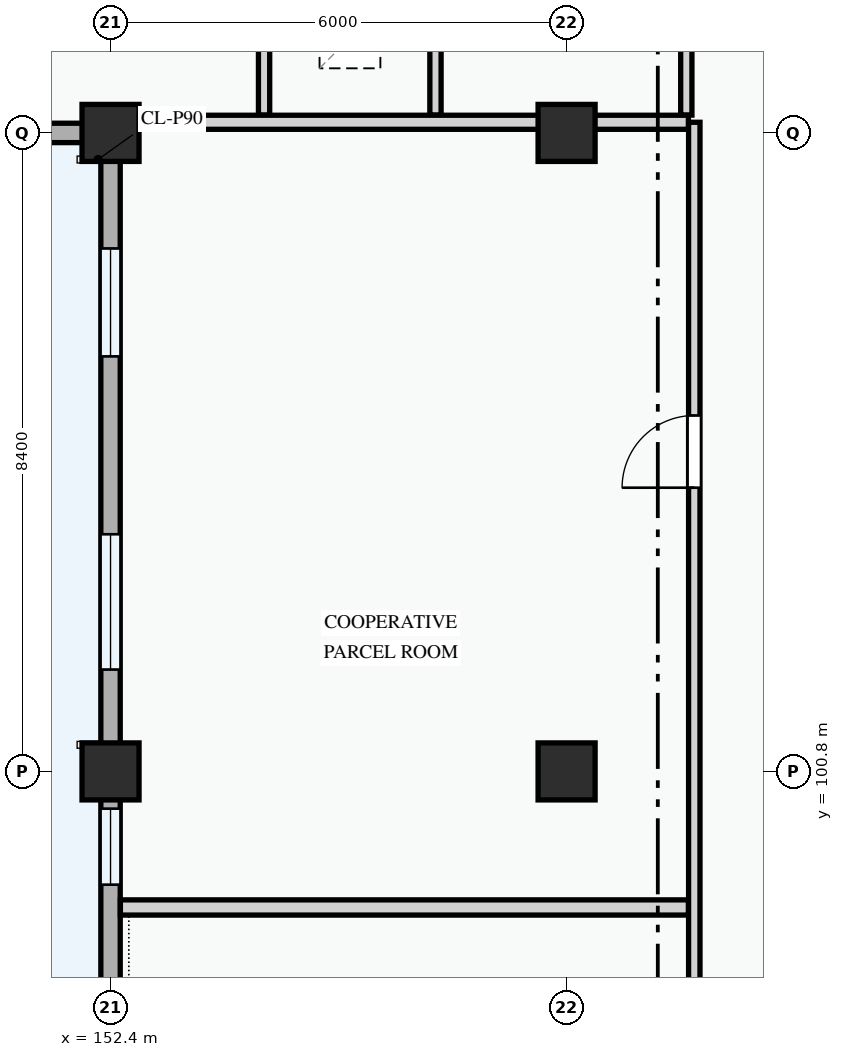
"""IFC4 building model, lengths in metres.
Left out: names, types, materials, properties, quantities, classifications, styles, units other than length and angle.
Written with IfcOpenShell. Run it as: python <this file> out.ifc"""

import sys

from ifc_helpers import new_model, si_unit, direction, frame, frame_2d, origin, origin_2d, place, context, subcontext, project, spatial, rectangle, extrude, element, fill, save


model = new_model("IFC4")
c1 = context("Model", 3, precision=1e-05, world=origin(), true_north=direction((0.0, 1.0)))
c2 = subcontext(c1, "Body", "Model", "MODEL_VIEW")
j1 = project(units=[si_unit("LENGTHUNIT", "METRE"), si_unit("PLANEANGLEUNIT", "RADIAN")], contexts=[c1])
p1 = place(None, origin())
s1 = spatial("IfcSite", under=j1, at=p1, CompositionType="ELEMENT")
p2 = place(p1, origin())
s2 = spatial("IfcBuilding", under=s1, at=p2, CompositionType="ELEMENT")
p3 = place(p2, origin())
s3 = spatial("IfcBuildingStorey", under=s2, at=p3, CompositionType="ELEMENT", Elevation=0.0)
for number, where, z_axis, x_axis in (
    (1, (152.4, 100.8, 0.0), (0.0, 0.0, 1.0), (1.0, 0.0, 0.0)),
    (2, (152.4, 109.2, 0.0), (0.0, 0.0, 1.0), (1.0, 0.0, 0.0)),
    (3, (158.4, 100.8, 0.0), (0.0, 0.0, 1.0), (1.0, 0.0, 0.0)),
    (4, (158.4, 109.2, 0.0), (0.0, 0.0, 1.0), (1.0, 0.0, 0.0)),
):
    element("IfcColumn", number, at=place(p3, frame(where, z_axis=z_axis, x_axis=x_axis)), inside=s3, PredefinedType="COLUMN", context=c2, shape_type="SweptSolid", body=[
        extrude(rectangle(XDim=0.75, YDim=0.75, at=origin_2d()), origin(), (0.0, 0.0, 1.0), 4.5),
    ])
p4 = place(p3, frame((144.0, 109.2, 0.0), z_axis=(0.0, 0.0, 1.0), x_axis=(1.0, 0.0, 0.0)))
e5 = element("IfcWall", 5, at=p4, inside=s3, PredefinedType="STANDARD", context=c2, shape_type="SweptSolid", body=[
    extrude(rectangle(XDim=8.4, YDim=0.255, at=frame_2d((4.2, 0.0))), origin(), (0.0, 0.0, 1.0), 3.485),
])
p5 = place(p4, frame((0.79, 0.0, 0.78)))
e6 = element("IfcOpeningElement", 6, at=p5, cuts=e5, PredefinedType="OPENING", context=c2, shape_type="SweptSolid", body=[
    extrude(rectangle(XDim=1.8, YDim=1.5, at=frame_2d((0.9, 0.75))), frame((0.0, 0.137, 0.0), z_axis=(0.0, -1.0, 0.0), x_axis=(1.0, 0.0, 0.0)), (0.0, 0.0, 1.0), 0.275),
])
p6 = place(p4, frame((3.525, 0.0, 0.78)))
e7 = element("IfcOpeningElement", 7, at=p6, cuts=e5, PredefinedType="OPENING", context=c2, shape_type="SweptSolid", body=[
    extrude(rectangle(XDim=2.05, YDim=1.6, at=frame_2d((1.025, 0.8))), frame((0.0, 0.137, 0.0), z_axis=(0.0, -1.0, 0.0), x_axis=(1.0, 0.0, 0.0)), (0.0, 0.0, 1.0), 0.275),
])
p7 = place(p4, frame((6.68, 0.0, 0.78)))
e8 = element("IfcOpeningElement", 8, at=p7, cuts=e5, PredefinedType="OPENING", context=c2, shape_type="SweptSolid", body=[
    extrude(rectangle(XDim=0.9, YDim=1.2, at=frame_2d((0.45, 0.6))), frame((0.0, 0.137, 0.0), z_axis=(0.0, -1.0, 0.0), x_axis=(1.0, 0.0, 0.0)), (0.0, 0.0, 1.0), 0.275),
])
p8 = place(p3, frame((152.4, 109.2, 0.0), z_axis=(0.0, 0.0, 1.0), x_axis=(0.0, -1.0, 0.0)))
e9 = element("IfcWall", 9, at=p8, inside=s3, PredefinedType="STANDARD", context=c2, shape_type="SweptSolid", body=[
    extrude(rectangle(XDim=8.4, YDim=0.255, at=frame_2d((4.2, 0.0))), origin(), (0.0, 0.0, 1.0), 3.485),
])
p9 = place(p8, frame((1.52, 0.0, 0.78)))
e10 = element("IfcOpeningElement", 10, at=p9, cuts=e9, PredefinedType="OPENING", context=c2, shape_type="SweptSolid", body=[
    extrude(rectangle(XDim=1.42, YDim=1.38, at=frame_2d((0.71, 0.69))), frame((0.0, 0.137, 0.0), z_axis=(0.0, -1.0, 0.0), x_axis=(1.0, 0.0, 0.0)), (0.0, 0.0, 1.0), 0.275),
])
p10 = place(p8, frame((5.28, 0.0, 0.78)))
e11 = element("IfcOpeningElement", 11, at=p10, cuts=e9, PredefinedType="OPENING", context=c2, shape_type="SweptSolid", body=[
    extrude(rectangle(XDim=1.78, YDim=1.42, at=frame_2d((0.89, 0.71))), frame((0.0, 0.137, 0.0), z_axis=(0.0, -1.0, 0.0), x_axis=(1.0, 0.0, 0.0)), (0.0, 0.0, 1.0), 0.275),
])
p11 = place(p3, frame((152.4, 100.8, 0.0), z_axis=(0.0, 0.0, 1.0), x_axis=(0.0, -1.0, 0.0)))
e12 = element("IfcWall", 12, at=p11, inside=s3, PredefinedType="STANDARD", context=c2, shape_type="SweptSolid", body=[
    extrude(rectangle(XDim=6.0, YDim=0.255, at=frame_2d((3.0, 0.0))), origin(), (0.0, 0.0, 1.0), 3.585),
])
p12 = place(p11, frame((0.49, 0.0, 0.78)))
e13 = element("IfcOpeningElement", 13, at=p12, cuts=e12, PredefinedType="OPENING", context=c2, shape_type="SweptSolid", body=[
    extrude(rectangle(XDim=1.0, YDim=1.25, at=frame_2d((0.5, 0.625))), frame((0.0, 0.137, 0.0), z_axis=(0.0, -1.0, 0.0), x_axis=(1.0, 0.0, 0.0)), (0.0, 0.0, 1.0), 0.275),
])
p13 = place(p11, frame((2.94, 0.0, 0.78)))
e14 = element("IfcOpeningElement", 14, at=p13, cuts=e12, PredefinedType="OPENING", context=c2, shape_type="SweptSolid", body=[
    extrude(rectangle(XDim=1.72, YDim=1.52, at=frame_2d((0.86, 0.76))), frame((0.0, 0.137, 0.0), z_axis=(0.0, -1.0, 0.0), x_axis=(1.0, 0.0, 0.0)), (0.0, 0.0, 1.0), 0.275),
])
for number, where, z_axis, x_axis in (
    (15, (154.42, 113.324, 0.0), (0.0, 0.0, 1.0), (0.0, -1.0, 0.0)),
    (16, (156.675, 113.324, 0.0), (0.0, 0.0, 1.0), (0.0, -1.0, 0.0)),
    (17, (159.975, 113.324, 0.0), (0.0, 0.0, 1.0), (0.0, -1.0, 0.0)),
):
    element("IfcWall", number, at=place(p3, frame(where, z_axis=z_axis, x_axis=x_axis)), inside=s3, PredefinedType="PARTITIONING", context=c2, shape_type="SweptSolid", body=[
        extrude(rectangle(XDim=3.889, YDim=0.148, at=frame_2d((1.945, 0.0))), origin(), (0.0, 0.0, 1.0), 4.2),
    ])
p14 = place(p3, frame((152.53, 99.01, 0.0), z_axis=(0.0, 0.0, 1.0), x_axis=(1.0, 0.0, 0.0)))
e18 = element("IfcWall", 18, at=p14, inside=s3, PredefinedType="PARTITIONING", context=c2, shape_type="SweptSolid", body=[
    extrude(rectangle(XDim=7.473, YDim=0.2, at=frame_2d((3.737, 0.0))), origin(), (0.0, 0.0, 1.0), 4.2),
])
p15 = place(p3, frame((152.46, 109.34, 0.0), z_axis=(0.0, 0.0, 1.0), x_axis=(1.0, 0.0, 0.0)))
e19 = element("IfcWall", 19, at=p15, inside=s3, PredefinedType="PARTITIONING", context=c2, shape_type="SweptSolid", body=[
    extrude(rectangle(XDim=7.543, YDim=0.185, at=frame_2d((3.771, 0.0))), origin(), (0.0, 0.0, 1.0), 3.485),
])
p16 = place(p3, frame((160.08, 80.53, 0.0), z_axis=(0.0, 0.0, 1.0), x_axis=(0.0, 1.0, 0.0)))
e20 = element("IfcWall", 20, at=p16, inside=s3, PredefinedType="PARTITIONING", context=c2, shape_type="SweptSolid", body=[
    extrude(rectangle(XDim=28.811, YDim=0.15, at=frame_2d((14.405, 0.0))), origin(), (0.0, 0.0, 1.0), 4.2),
])
p17 = place(p16, frame((2.453, 0.0, 0.0)))
e21 = element("IfcOpeningElement", 21, at=p17, cuts=e20, PredefinedType="OPENING", context=c2, shape_type="SweptSolid", body=[
    extrude(rectangle(XDim=0.95, YDim=2.1, at=frame_2d((0.475, 1.05))), frame((0.0, 0.085, 0.0), z_axis=(0.0, -1.0, 0.0), x_axis=(1.0, 0.0, 0.0)), (0.0, 0.0, 1.0), 0.17),
])
p18 = place(p16, frame((9.71, 0.0, 0.0)))
e22 = element("IfcOpeningElement", 22, at=p18, cuts=e20, PredefinedType="OPENING", context=c2, shape_type="SweptSolid", body=[
    extrude(rectangle(XDim=0.95, YDim=2.1, at=frame_2d((0.475, 1.05))), frame((0.0, 0.085, 0.0), z_axis=(0.0, -1.0, 0.0), x_axis=(1.0, 0.0, 0.0)), (0.0, 0.0, 1.0), 0.17),
])
p19 = place(p16, frame((24.003, 0.0, 0.0)))
e23 = element("IfcOpeningElement", 23, at=p19, cuts=e20, PredefinedType="OPENING", context=c2, shape_type="SweptSolid", body=[
    extrude(rectangle(XDim=0.95, YDim=2.1, at=frame_2d((0.475, 1.05))), frame((0.0, 0.085, 0.0), z_axis=(0.0, -1.0, 0.0), x_axis=(1.0, 0.0, 0.0)), (0.0, 0.0, 1.0), 0.17),
])
p20 = place(p9, origin())
e24 = element("IfcWindow", 24, at=p20, inside=s3, PartitioningType="SINGLE_PANEL", PredefinedType="WINDOW", context=c2, shape_type="SweptSolid", body=[
    extrude(rectangle(XDim=1.42, YDim=1.38, at=frame_2d((0.71, 0.69))), frame((0.0, 0.03, 0.0), z_axis=(0.0, -1.0, 0.0), x_axis=(1.0, 0.0, 0.0)), (0.0, 0.0, 1.0), 0.06),
])
fill(e10, e24)
p21 = place(p10, origin())
e25 = element("IfcWindow", 25, at=p21, inside=s3, PartitioningType="DOUBLE_PANEL_VERTICAL", PredefinedType="WINDOW", context=c2, shape_type="SweptSolid", body=[
    extrude(rectangle(XDim=1.78, YDim=1.42, at=frame_2d((0.89, 0.71))), frame((0.0, 0.03, 0.0), z_axis=(0.0, -1.0, 0.0), x_axis=(1.0, 0.0, 0.0)), (0.0, 0.0, 1.0), 0.06),
])
fill(e11, e25)
p22 = place(p12, origin())
e26 = element("IfcWindow", 26, at=p22, inside=s3, PartitioningType="SINGLE_PANEL", PredefinedType="WINDOW", context=c2, shape_type="SweptSolid", body=[
    extrude(rectangle(XDim=1.0, YDim=1.25, at=frame_2d((0.5, 0.625))), frame((0.0, 0.03, 0.0), z_axis=(0.0, -1.0, 0.0), x_axis=(1.0, 0.0, 0.0)), (0.0, 0.0, 1.0), 0.06),
])
fill(e13, e26)
p23 = place(p19, origin())
e27 = element("IfcDoor", 27, at=p23, inside=s3, OperationType="SINGLE_SWING_LEFT", PredefinedType="DOOR", context=c2, shape_type="SweptSolid", body=[
    extrude(rectangle(XDim=0.95, YDim=2.1, at=frame_2d((0.475, 1.05))), frame((0.0, 0.025, 0.0), z_axis=(0.0, -1.0, 0.0), x_axis=(1.0, 0.0, 0.0)), (0.0, 0.0, 1.0), 0.05),
])
fill(e23, e27)
save(model, sys.argv[1])
